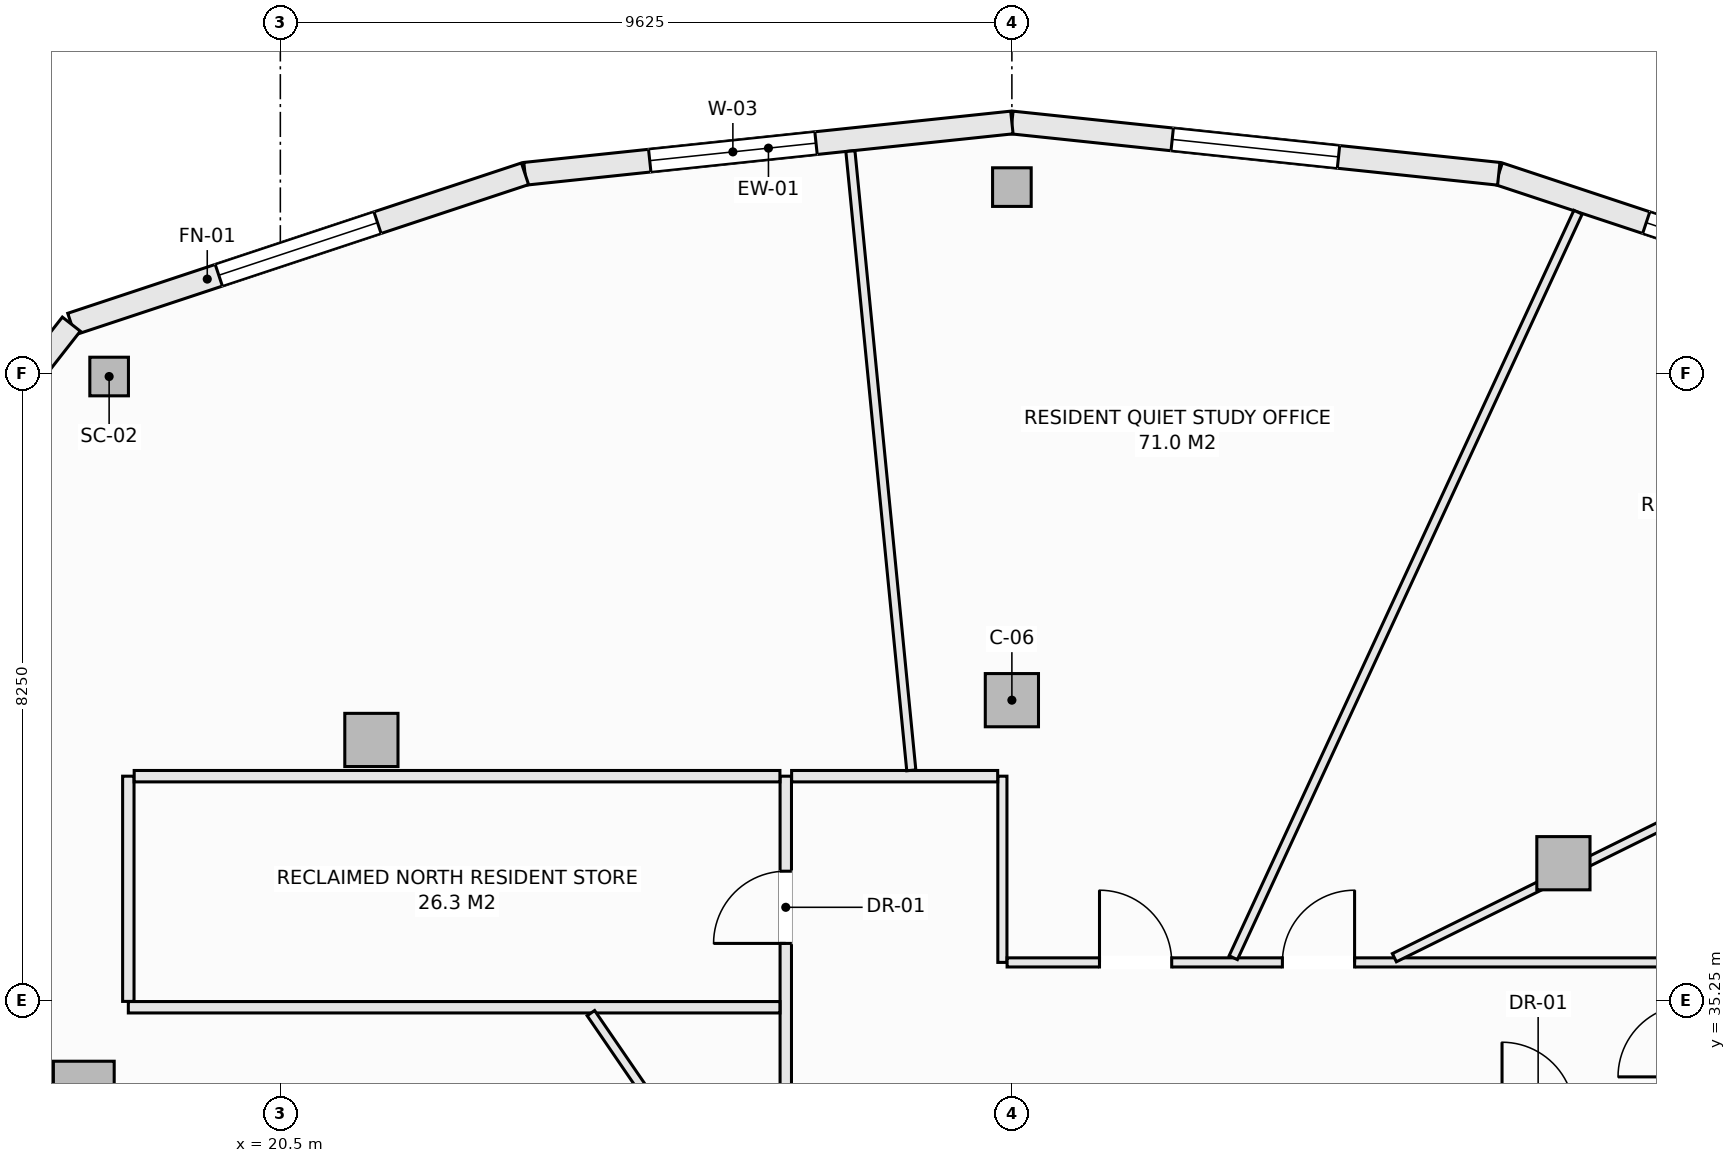
"""IFC4 building model, lengths in metres.
Left out: names, types, materials, properties, quantities, classifications, styles, units other than length and angle.
Written with IfcOpenShell. Run it as: python <this file> out.ifc"""

import sys

from ifc_helpers import new_model, si_unit, direction, frame, frame_2d, origin, origin_2d, place, context, subcontext, project, spatial, rectangle, hollow_rectangle, extrude, element, fill, save


model = new_model("IFC4")
c1 = context("Model", 3, precision=1e-05, world=origin(), true_north=direction((0.0, 1.0)))
c2 = subcontext(c1, "Body", "Model", "MODEL_VIEW")
j1 = project(units=[si_unit("LENGTHUNIT", "METRE"), si_unit("PLANEANGLEUNIT", "RADIAN")], contexts=[c1])
p1 = place(None, origin())
s1 = spatial("IfcSite", under=j1, at=p1, CompositionType="ELEMENT")
p2 = place(p1, origin())
s2 = spatial("IfcBuilding", under=s1, at=p2, CompositionType="ELEMENT")
p3 = place(p2, frame((0.0, 0.0, 203.0)))
s3 = spatial("IfcBuildingStorey", under=s2, at=p3, CompositionType="ELEMENT", Elevation=203.0)
for number, where, z_axis, x_axis in (
    (1, (30.125, 45.95, -0.27), (0.0, 0.0, 1.0), (1.0, 0.0, 0.0)),
    (2, (18.247, 43.458, -0.27), (0.0, 0.0, 1.0), (1.0, 0.0, 0.0)),
):
    element("IfcColumn", number, at=place(p3, frame(where, z_axis=z_axis, x_axis=x_axis)), inside=s3, PredefinedType="COLUMN", context=c2, shape_type="SweptSolid", body=[
        extrude(hollow_rectangle(XDim=0.508, YDim=0.508, WallThickness=0.019, at=origin_2d()), origin(), (0.0, 0.0, 1.0), 3.3),
    ])
for number, where, z_axis, x_axis in (
    (3, (37.382, 37.055, -0.27), (0.0, 0.0, 1.0), (1.0, 0.0, 0.0)),
    (4, (30.125, 39.2, -0.27), (0.0, 0.0, 1.0), (1.0, 0.0, 0.0)),
    (5, (21.698, 38.677, -0.27), (0.0, 0.0, 1.0), (1.0, 0.0, 0.0)),
):
    element("IfcColumn", number, at=place(p3, frame(where, z_axis=z_axis, x_axis=x_axis)), inside=s3, PredefinedType="COLUMN", context=c2, shape_type="SweptSolid", body=[
        extrude(rectangle(XDim=0.7, YDim=0.7, at=origin_2d()), origin(), (0.0, 0.0, 1.0), 3.3),
    ])
p4 = place(p3, frame((17.914, 34.05, -0.27), z_axis=(0.0, 0.0, 1.0), x_axis=(1.0, 0.0, 0.0)))
e6 = element("IfcColumn", 6, at=p4, inside=s3, PredefinedType="PILASTER", context=c2, shape_type="SweptSolid", body=[
    extrude(rectangle(XDim=0.8, YDim=0.8, at=origin_2d()), origin(), (0.0, 0.0, 1.0), 3.3),
])
p5 = place(p3, frame((36.531, 46.125, 0.0), z_axis=(0.0, 0.0, 1.0), x_axis=(0.949240877604, -0.314550085495, 0.0)))
e7 = element("IfcWall", 7, at=p5, inside=s3, PredefinedType="SOLIDWALL", context=c2, shape_type="SweptSolid", body=[
    extrude(rectangle(XDim=6.288, YDim=0.3, at=frame_2d((3.144, 0.0))), origin(), (0.0, 0.0, 1.0), 2.605),
])
p6 = place(p5, frame((2.044, 0.0, 0.72)))
e8 = element("IfcOpeningElement", 8, at=p6, cuts=e7, PredefinedType="OPENING", context=c2, shape_type="SweptSolid", body=[
    extrude(rectangle(XDim=2.2, YDim=1.65, at=frame_2d((1.1, 0.825))), frame((0.0, 0.16, 0.0), z_axis=(0.0, -1.0, 0.0), x_axis=(1.0, 0.0, 0.0)), (0.0, 0.0, 1.0), 0.32),
])
p7 = place(p3, frame((30.125, 46.8, 0.0), z_axis=(0.0, 0.0, 1.0), x_axis=(0.994497142298, -0.104763705363, 0.0)))
e9 = element("IfcWall", 9, at=p7, inside=s3, PredefinedType="SOLIDWALL", context=c2, shape_type="SweptSolid", body=[
    extrude(rectangle(XDim=6.441, YDim=0.3, at=frame_2d((3.221, 0.0))), origin(), (0.0, 0.0, 1.0), 2.605),
])
p8 = place(p7, frame((2.121, 0.0, 0.72)))
e10 = element("IfcOpeningElement", 10, at=p8, cuts=e9, PredefinedType="OPENING", context=c2, shape_type="SweptSolid", body=[
    extrude(rectangle(XDim=2.2, YDim=1.65, at=frame_2d((1.1, 0.825))), frame((0.0, 0.16, 0.0), z_axis=(0.0, -1.0, 0.0), x_axis=(1.0, 0.0, 0.0)), (0.0, 0.0, 1.0), 0.32),
])
p9 = place(p3, frame((23.719, 46.125, 0.0), z_axis=(0.0, 0.0, 1.0), x_axis=(0.994497142298, 0.104763705363, 0.0)))
e11 = element("IfcWall", 11, at=p9, inside=s3, PredefinedType="SOLIDWALL", context=c2, shape_type="SweptSolid", body=[
    extrude(rectangle(XDim=6.441, YDim=0.3, at=frame_2d((3.221, 0.0))), origin(), (0.0, 0.0, 1.0), 2.605),
])
p10 = place(p9, frame((1.65, 0.0, 0.72)))
e12 = element("IfcOpeningElement", 12, at=p10, cuts=e11, PredefinedType="OPENING", context=c2, shape_type="SweptSolid", body=[
    extrude(rectangle(XDim=2.2, YDim=1.65, at=frame_2d((1.1, 0.825))), frame((0.0, 0.16, 0.0), z_axis=(0.0, -1.0, 0.0), x_axis=(1.0, 0.0, 0.0)), (0.0, 0.0, 1.0), 0.32),
])
p11 = place(p3, frame((17.75, 44.147, 0.0), z_axis=(0.0, 0.0, 1.0), x_axis=(0.949240877604, 0.314550085495, 0.0)))
e13 = element("IfcWall", 13, at=p11, inside=s3, PredefinedType="SOLIDWALL", context=c2, shape_type="SweptSolid", body=[
    extrude(rectangle(XDim=6.288, YDim=0.3, at=frame_2d((3.144, 0.0))), origin(), (0.0, 0.0, 1.0), 2.605),
])
p12 = place(p11, frame((2.044, 0.0, 0.72)))
e14 = element("IfcOpeningElement", 14, at=p12, cuts=e13, PredefinedType="OPENING", context=c2, shape_type="SweptSolid", body=[
    extrude(rectangle(XDim=2.2, YDim=1.65, at=frame_2d((1.1, 0.825))), frame((0.0, 0.16, 0.0), z_axis=(0.0, -1.0, 0.0), x_axis=(1.0, 0.0, 0.0)), (0.0, 0.0, 1.0), 0.32),
])
p13 = place(p3, frame((14.117, 39.507, 0.0), z_axis=(0.0, 0.0, 1.0), x_axis=(0.616450126935, 0.787393955401, 0.0)))
e15 = element("IfcWall", 15, at=p13, inside=s3, PredefinedType="SOLIDWALL", context=c2, shape_type="SweptSolid", body=[
    extrude(rectangle(XDim=5.893, YDim=0.3, at=frame_2d((2.946, 0.0))), origin(), (0.0, 0.0, 1.0), 2.605),
])
p14 = place(p13, frame((1.846, 0.0, 0.72)))
e16 = element("IfcOpeningElement", 16, at=p14, cuts=e15, PredefinedType="OPENING", context=c2, shape_type="SweptSolid", body=[
    extrude(rectangle(XDim=2.2, YDim=1.65, at=frame_2d((1.1, 0.825))), frame((0.0, 0.16, 0.0), z_axis=(0.0, -1.0, 0.0), x_axis=(1.0, 0.0, 0.0)), (0.0, 0.0, 1.0), 0.32),
])
p15 = place(p3, frame((27.15, 34.002, 0.0), z_axis=(0.0, 0.0, 1.0), x_axis=(0.0, 1.0, 0.0)))
e17 = element("IfcWall", 17, at=p15, inside=s3, PredefinedType="PARTITIONING", context=c2, shape_type="SweptSolid", body=[
    extrude(rectangle(XDim=4.198, YDim=0.15, at=frame_2d((2.099, 0.0))), origin(), (0.0, 0.0, 1.0), 3.03),
])
p16 = place(p15, frame((1.998, 0.0, 0.0)))
e18 = element("IfcOpeningElement", 18, at=p16, cuts=e17, PredefinedType="OPENING", context=c2, shape_type="SweptSolid", body=[
    extrude(rectangle(XDim=0.95, YDim=2.1, at=frame_2d((0.475, 1.05))), frame((0.0, 0.085, 0.0), z_axis=(0.0, -1.0, 0.0), x_axis=(1.0, 0.0, 0.0)), (0.0, 0.0, 1.0), 0.17),
])
p17 = place(p3, frame((30.0, 35.75, 0.0), z_axis=(0.0, 0.0, 1.0), x_axis=(0.0, 1.0, 0.0)))
e19 = element("IfcWall", 19, at=p17, inside=s3, PredefinedType="PARTITIONING", context=c2, shape_type="SweptSolid", body=[
    extrude(rectangle(XDim=2.45, YDim=0.12, at=frame_2d((1.225, 0.0))), origin(), (0.0, 0.0, 1.0), 3.03),
])
p18 = place(p3, frame((18.5, 35.16, 0.0), z_axis=(0.0, 0.0, 1.0), x_axis=(1.0, 0.0, 0.0)))
e20 = element("IfcWall", 20, at=p18, inside=s3, PredefinedType="PARTITIONING", context=c2, shape_type="SweptSolid", body=[
    extrude(rectangle(XDim=8.573, YDim=0.15, at=frame_2d((4.287, 0.0))), origin(), (0.0, 0.0, 1.0), 3.03),
])
p19 = place(p3, frame((18.5, 35.237, 0.0), z_axis=(0.0, 0.0, 1.0), x_axis=(0.0, 1.0, 0.0)))
e21 = element("IfcWall", 21, at=p19, inside=s3, PredefinedType="PARTITIONING", context=c2, shape_type="SweptSolid", body=[
    extrude(rectangle(XDim=2.963, YDim=0.15, at=frame_2d((1.481, 0.0))), origin(), (0.0, 0.0, 1.0), 3.03),
])
p20 = place(p3, frame((18.577, 38.2, 0.0), z_axis=(0.0, 0.0, 1.0), x_axis=(1.0, 0.0, 0.0)))
e22 = element("IfcWall", 22, at=p20, inside=s3, PredefinedType="PARTITIONING", context=c2, shape_type="SweptSolid", body=[
    extrude(rectangle(XDim=8.496, YDim=0.15, at=frame_2d((4.248, 0.0))), origin(), (0.0, 0.0, 1.0), 3.03),
])
p21 = place(p3, frame((27.227, 38.2, 0.0), z_axis=(0.0, 0.0, 1.0), x_axis=(1.0, 0.0, 0.0)))
e23 = element("IfcWall", 23, at=p21, inside=s3, PredefinedType="PARTITIONING", context=c2, shape_type="SweptSolid", body=[
    extrude(rectangle(XDim=2.711, YDim=0.15, at=frame_2d((1.355, 0.0))), origin(), (0.0, 0.0, 1.0), 3.03),
])
p22 = place(p3, frame((30.062, 35.75, 0.0), z_axis=(0.0, 0.0, 1.0), x_axis=(1.0, 0.0, 0.0)))
e24 = element("IfcWall", 24, at=p22, inside=s3, PredefinedType="PARTITIONING", context=c2, shape_type="SweptSolid", body=[
    extrude(rectangle(XDim=8.988, YDim=0.12, at=frame_2d((4.494, 0.0))), origin(), (0.0, 0.0, 1.0), 2.478),
])
p23 = place(p22, frame((3.622, 0.0, 0.0)))
e25 = element("IfcOpeningElement", 25, at=p23, cuts=e24, PredefinedType="OPENING", context=c2, shape_type="SweptSolid", body=[
    extrude(rectangle(XDim=0.95, YDim=2.1, at=frame_2d((0.475, 1.05))), frame((0.0, 0.07, 0.0), z_axis=(0.0, -1.0, 0.0), x_axis=(1.0, 0.0, 0.0)), (0.0, 0.0, 1.0), 0.14),
])
p24 = place(p22, frame((1.216, 0.0, 0.0)))
e26 = element("IfcOpeningElement", 26, at=p24, cuts=e24, PredefinedType="OPENING", context=c2, shape_type="SweptSolid", body=[
    extrude(rectangle(XDim=0.95, YDim=2.1, at=frame_2d((0.475, 1.05))), frame((0.0, 0.07, 0.0), z_axis=(0.0, -1.0, 0.0), x_axis=(1.0, 0.0, 0.0)), (0.0, 0.0, 1.0), 0.14),
])
p25 = place(p3, frame((28.0, 46.423, 0.0), z_axis=(0.0, 0.0, 1.0), x_axis=(0.097888269922, -0.995197410875, 0.0)))
e27 = element("IfcWall", 27, at=p25, inside=s3, PredefinedType="PARTITIONING", context=c2, shape_type="SweptSolid", body=[
    extrude(rectangle(XDim=8.186, YDim=0.12, at=frame_2d((4.093, 0.0))), origin(), (0.0, 0.0, 1.0), 3.03),
])
p26 = place(p3, frame((35.157, 35.812, 0.0), z_axis=(0.0, 0.0, 1.0), x_axis=(0.896376577458, 0.443293391992, 0.0)))
e28 = element("IfcWall", 28, at=p26, inside=s3, PredefinedType="PARTITIONING", context=c2, shape_type="SweptSolid", body=[
    extrude(rectangle(XDim=10.998, YDim=0.12, at=frame_2d((5.499, 0.0))), origin(), (0.0, 0.0, 1.0), 2.478),
])
p27 = place(p3, frame((33.038, 35.812, 0.0), z_axis=(0.0, 0.0, 1.0), x_axis=(0.419785881818, 0.907623167083, 0.0)))
e29 = element("IfcWall", 29, at=p27, inside=s3, PredefinedType="PARTITIONING", context=c2, shape_type="SweptSolid", body=[
    extrude(rectangle(XDim=10.806, YDim=0.12, at=frame_2d((5.403, 0.0))), origin(), (0.0, 0.0, 1.0), 3.03),
])
p28 = place(p3, frame((24.586, 35.083, 0.0), z_axis=(0.0, 0.0, 1.0), x_axis=(0.565231440294, -0.824932372321, 0.0)))
e30 = element("IfcWall", 30, at=p28, inside=s3, PredefinedType="PARTITIONING", context=c2, shape_type="SweptSolid", body=[
    extrude(rectangle(XDim=1.311, YDim=0.12, at=frame_2d((0.655, 0.0))), origin(), (0.0, 0.0, 1.0), 3.03),
])
p29 = place(p6, origin())
e31 = element("IfcWindow", 31, at=p29, inside=s3, PartitioningType="SINGLE_PANEL", PredefinedType="WINDOW", context=c2, shape_type="SweptSolid", body=[
    extrude(rectangle(XDim=2.2, YDim=1.65, at=frame_2d((1.1, 0.825))), frame((0.0, 0.03, 0.0), z_axis=(0.0, -1.0, 0.0), x_axis=(1.0, 0.0, 0.0)), (0.0, 0.0, 1.0), 0.06),
])
fill(e8, e31)
p30 = place(p8, origin())
e32 = element("IfcWindow", 32, at=p30, inside=s3, PartitioningType="SINGLE_PANEL", PredefinedType="WINDOW", context=c2, shape_type="SweptSolid", body=[
    extrude(rectangle(XDim=2.2, YDim=1.65, at=frame_2d((1.1, 0.825))), frame((0.0, 0.03, 0.0), z_axis=(0.0, -1.0, 0.0), x_axis=(1.0, 0.0, 0.0)), (0.0, 0.0, 1.0), 0.06),
])
fill(e10, e32)
p31 = place(p10, origin())
e33 = element("IfcWindow", 33, at=p31, inside=s3, PartitioningType="SINGLE_PANEL", PredefinedType="WINDOW", context=c2, shape_type="SweptSolid", body=[
    extrude(rectangle(XDim=2.2, YDim=1.65, at=frame_2d((1.1, 0.825))), frame((0.0, 0.03, 0.0), z_axis=(0.0, -1.0, 0.0), x_axis=(1.0, 0.0, 0.0)), (0.0, 0.0, 1.0), 0.06),
])
fill(e12, e33)
p32 = place(p12, origin())
e34 = element("IfcWindow", 34, at=p32, inside=s3, PartitioningType="SINGLE_PANEL", PredefinedType="WINDOW", context=c2, shape_type="SweptSolid", body=[
    extrude(rectangle(XDim=2.2, YDim=1.65, at=frame_2d((1.1, 0.825))), frame((0.0, 0.03, 0.0), z_axis=(0.0, -1.0, 0.0), x_axis=(1.0, 0.0, 0.0)), (0.0, 0.0, 1.0), 0.06),
])
fill(e14, e34)
p33 = place(p16, origin())
e35 = element("IfcDoor", 35, at=p33, inside=s3, OperationType="SINGLE_SWING_LEFT", PredefinedType="DOOR", context=c2, shape_type="SweptSolid", body=[
    extrude(rectangle(XDim=0.95, YDim=2.1, at=frame_2d((0.475, 1.05))), frame((0.0, 0.025, 0.0), z_axis=(0.0, -1.0, 0.0), x_axis=(1.0, 0.0, 0.0)), (0.0, 0.0, 1.0), 0.05),
])
fill(e18, e35)
p34 = place(p23, origin())
e36 = element("IfcDoor", 36, at=p34, inside=s3, OperationType="SINGLE_SWING_RIGHT", PredefinedType="DOOR", context=c2, shape_type="SweptSolid", body=[
    extrude(rectangle(XDim=0.95, YDim=2.1, at=frame_2d((0.475, 1.05))), frame((0.0, 0.025, 0.0), z_axis=(0.0, -1.0, 0.0), x_axis=(1.0, 0.0, 0.0)), (0.0, 0.0, 1.0), 0.05),
])
fill(e25, e36)
p35 = place(p24, origin())
e37 = element("IfcDoor", 37, at=p35, inside=s3, OperationType="SINGLE_SWING_LEFT", PredefinedType="DOOR", context=c2, shape_type="SweptSolid", body=[
    extrude(rectangle(XDim=0.95, YDim=2.1, at=frame_2d((0.475, 1.05))), frame((0.0, 0.025, 0.0), z_axis=(0.0, -1.0, 0.0), x_axis=(1.0, 0.0, 0.0)), (0.0, 0.0, 1.0), 0.05),
])
fill(e26, e37)
save(model, sys.argv[1])
